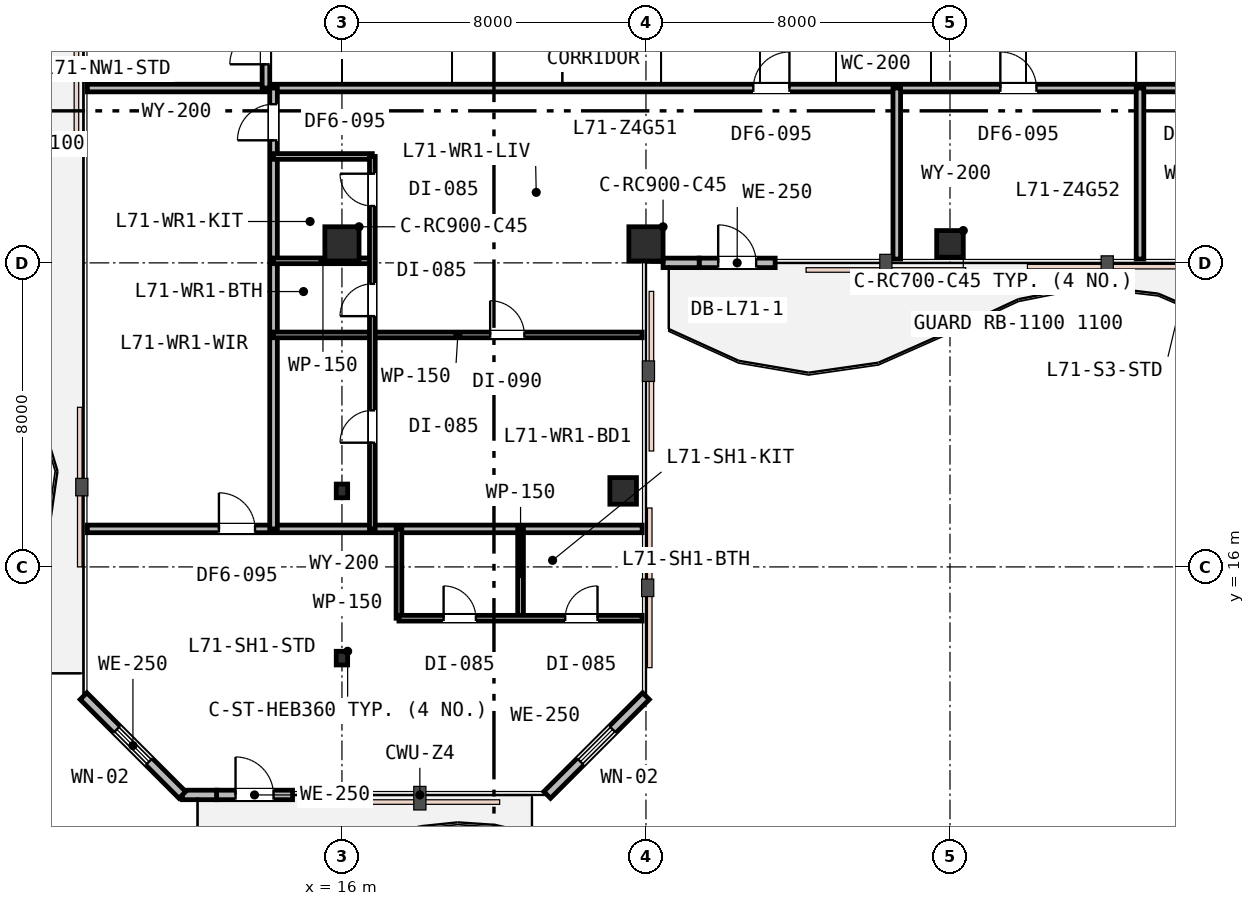
"""IFC4 building model, lengths in metres.
Left out: names, types, materials, properties, quantities, classifications, styles, units other than length and angle.
Written with IfcOpenShell. Run it as: python <this file> out.ifc"""

import sys

from ifc_helpers import new_model, si_unit, direction, frame, frame_2d, origin, origin_2d, place, context, subcontext, project, spatial, rectangle, i_section, extrude, element, fill, save


model = new_model("IFC4")
c1 = context("Model", 3, precision=1e-05, world=origin(), true_north=direction((0.0, 1.0)))
c2 = subcontext(c1, "Body", "Model", "MODEL_VIEW")
j1 = project(units=[si_unit("LENGTHUNIT", "METRE"), si_unit("PLANEANGLEUNIT", "RADIAN")], contexts=[c1])
p1 = place(None, origin())
s1 = spatial("IfcSite", under=j1, at=p1, CompositionType="ELEMENT")
p2 = place(p1, origin())
s2 = spatial("IfcBuilding", under=s1, at=p2, CompositionType="ELEMENT")
p3 = place(p2, frame((0.0, 0.0, 275.4)))
s3 = spatial("IfcBuildingStorey", under=s2, at=p3, CompositionType="ELEMENT", Elevation=275.4)
for number, where, z_axis, x_axis in (
    (1, (16.0, 24.5, 0.0), (0.0, 0.0, 1.0), (1.0, 0.0, 0.0)),
    (2, (24.0, 24.5, 0.0), (0.0, 0.0, 1.0), (1.0, 0.0, 0.0)),
):
    element("IfcColumn", number, at=place(p3, frame(where, z_axis=z_axis, x_axis=x_axis)), inside=s3, PredefinedType="COLUMN", context=c2, shape_type="SweptSolid", body=[
        extrude(rectangle(XDim=0.9, YDim=0.9, at=origin_2d()), origin(), (0.0, 0.0, 1.0), 3.8),
    ])
for number, where, z_axis, x_axis in (
    (3, (32.0, 24.5, 0.0), (0.0, 0.0, 1.0), (1.0, 0.0, 0.0)),
    (4, (23.4, 18.0, 0.0), (0.0, 0.0, 1.0), (1.0, 0.0, 0.0)),
):
    element("IfcColumn", number, at=place(p3, frame(where, z_axis=z_axis, x_axis=x_axis)), inside=s3, PredefinedType="COLUMN", context=c2, shape_type="SweptSolid", body=[
        extrude(rectangle(XDim=0.7, YDim=0.7, at=origin_2d()), origin(), (0.0, 0.0, 1.0), 3.8),
    ])
for number, where, z_axis, x_axis in (
    (5, (16.0, 13.6, 0.0), (0.0, 0.0, 1.0), (1.0, 0.0, 0.0)),
    (6, (16.0, 18.0, 0.0), (0.0, 0.0, 1.0), (1.0, 0.0, 0.0)),
):
    element("IfcColumn", number, at=place(p3, frame(where, z_axis=z_axis, x_axis=x_axis)), inside=s3, PredefinedType="COLUMN", context=c2, shape_type="SweptSolid", body=[
        extrude(i_section(OverallWidth=0.3, OverallDepth=0.36, WebThickness=0.013, FlangeThickness=0.022, FilletRadius=0.027, at=origin_2d()), origin(), (0.0, 0.0, 1.0), 3.8),
    ])
p4 = place(p3, frame((12.7, 10.0, 0.0), z_axis=(0.0, 0.0, 1.0), x_axis=(1.0, 0.0, 0.0)))
e7 = element("IfcWall", 7, at=p4, inside=s3, PredefinedType="STANDARD", context=c2, shape_type="SweptSolid", body=[
    extrude(rectangle(XDim=2.0, YDim=0.25, at=frame_2d((1.0, 0.0))), origin(), (0.0, 0.0, 1.0), 3.53),
])
p5 = place(p4, frame((0.5, 0.0, 0.0)))
e8 = element("IfcOpeningElement", 8, at=p5, cuts=e7, PredefinedType="OPENING", context=c2, shape_type="SweptSolid", body=[
    extrude(rectangle(XDim=1.0, YDim=2.15, at=frame_2d((0.5, 1.075))), frame((0.0, 0.135, 0.0), z_axis=(0.0, -1.0, 0.0), x_axis=(1.0, 0.0, 0.0)), (0.0, 0.0, 1.0), 0.27),
])
p6 = place(p3, frame((11.8, 10.0, 0.0), z_axis=(0.0, 0.0, 1.0), x_axis=(1.0, 0.0, 0.0)))
e9 = element("IfcWall", 9, at=p6, inside=s3, PredefinedType="STANDARD", context=c2, shape_type="SweptSolid", body=[
    extrude(rectangle(XDim=0.9, YDim=0.25, at=frame_2d((0.45, 0.0))), origin(), (0.0, 0.0, 1.0), 3.53),
])
p7 = place(p3, frame((21.4, 10.0, 0.0), z_axis=(0.0, 0.0, 1.0), x_axis=(0.707106781187, 0.707106781187, 0.0)))
e10 = element("IfcWall", 10, at=p7, inside=s3, PredefinedType="STANDARD", context=c2, shape_type="SweptSolid", body=[
    extrude(rectangle(XDim=3.677, YDim=0.25, at=frame_2d((1.839, 0.0))), origin(), (0.0, 0.0, 1.0), 3.53),
])
p8 = place(p7, frame((1.238, 0.0, 0.85)))
e11 = element("IfcOpeningElement", 11, at=p8, cuts=e10, PredefinedType="OPENING", context=c2, shape_type="SweptSolid", body=[
    extrude(rectangle(XDim=1.2, YDim=1.6, at=frame_2d((0.6, 0.8))), frame((0.0, 0.135, 0.0), z_axis=(0.0, -1.0, 0.0), x_axis=(1.0, 0.0, 0.0)), (0.0, 0.0, 1.0), 0.27),
])
p9 = place(p3, frame((25.4, 24.0, 0.0), z_axis=(0.0, 0.0, 1.0), x_axis=(1.0, 0.0, 0.0)))
e12 = element("IfcWall", 12, at=p9, inside=s3, PredefinedType="STANDARD", context=c2, shape_type="SweptSolid", body=[
    extrude(rectangle(XDim=2.0, YDim=0.25, at=frame_2d((1.0, 0.0))), origin(), (0.0, 0.0, 1.0), 3.27),
])
p10 = place(p9, frame((0.5, 0.0, 0.0)))
e13 = element("IfcOpeningElement", 13, at=p10, cuts=e12, PredefinedType="OPENING", context=c2, shape_type="SweptSolid", body=[
    extrude(rectangle(XDim=1.0, YDim=2.15, at=frame_2d((0.5, 1.075))), frame((0.0, 0.135, 0.0), z_axis=(0.0, -1.0, 0.0), x_axis=(1.0, 0.0, 0.0)), (0.0, 0.0, 1.0), 0.27),
])
p11 = place(p3, frame((24.45, 24.0, 0.0), z_axis=(0.0, 0.0, 1.0), x_axis=(1.0, 0.0, 0.0)))
e14 = element("IfcWall", 14, at=p11, inside=s3, PredefinedType="STANDARD", context=c2, shape_type="SweptSolid", body=[
    extrude(rectangle(XDim=0.95, YDim=0.25, at=frame_2d((0.475, 0.0))), origin(), (0.0, 0.0, 1.0), 3.27),
])
p12 = place(p3, frame((9.2, 12.6, 0.0), z_axis=(0.0, 0.0, 1.0), x_axis=(0.707106781187, -0.707106781187, 0.0)))
e15 = element("IfcWall", 15, at=p12, inside=s3, PredefinedType="STANDARD", context=c2, shape_type="SweptSolid", body=[
    extrude(rectangle(XDim=3.677, YDim=0.25, at=frame_2d((1.839, 0.0))), origin(), (0.0, 0.0, 1.0), 3.53),
])
p13 = place(p12, frame((1.238, 0.0, 0.85)))
e16 = element("IfcOpeningElement", 16, at=p13, cuts=e15, PredefinedType="OPENING", context=c2, shape_type="SweptSolid", body=[
    extrude(rectangle(XDim=1.2, YDim=1.6, at=frame_2d((0.6, 0.8))), frame((0.0, 0.135, 0.0), z_axis=(0.0, -1.0, 0.0), x_axis=(1.0, 0.0, 0.0)), (0.0, 0.0, 1.0), 0.27),
])
p14 = place(p3, frame((9.3, 28.6, 0.0), z_axis=(0.0, 0.0, 1.0), x_axis=(1.0, 0.0, 0.0)))
e17 = element("IfcWall", 17, at=p14, inside=s3, PredefinedType="PARTITIONING", context=c2, shape_type="SweptSolid", body=[
    extrude(rectangle(XDim=4.7, YDim=0.2, at=frame_2d((2.35, 0.0))), origin(), (0.0, 0.0, 1.0), 3.53),
])
p15 = place(p3, frame((14.2, 28.6, 0.0), z_axis=(0.0, 0.0, 1.0), x_axis=(1.0, 0.0, 0.0)))
e18 = element("IfcWall", 18, at=p15, inside=s3, PredefinedType="PARTITIONING", context=c2, shape_type="SweptSolid", body=[
    extrude(rectangle(XDim=31.7, YDim=0.2, at=frame_2d((15.85, 0.0))), origin(), (0.0, 0.0, 1.0), 3.16),
])
p16 = place(p15, frame((12.625, 0.0, 0.0)))
e19 = element("IfcOpeningElement", 19, at=p16, cuts=e18, PredefinedType="OPENING", context=c2, shape_type="SweptSolid", body=[
    extrude(rectangle(XDim=0.95, YDim=2.15, at=frame_2d((0.475, 1.075))), frame((0.0, 0.11, 0.0), z_axis=(0.0, -1.0, 0.0), x_axis=(1.0, 0.0, 0.0)), (0.0, 0.0, 1.0), 0.22),
])
p17 = place(p15, frame((19.125, 0.0, 0.0)))
e20 = element("IfcOpeningElement", 20, at=p17, cuts=e18, PredefinedType="OPENING", context=c2, shape_type="SweptSolid", body=[
    extrude(rectangle(XDim=0.95, YDim=2.15, at=frame_2d((0.475, 1.075))), frame((0.0, 0.11, 0.0), z_axis=(0.0, -1.0, 0.0), x_axis=(1.0, 0.0, 0.0)), (0.0, 0.0, 1.0), 0.22),
])
p18 = place(p15, frame((24.016, 0.0, 0.0)))
e21 = element("IfcOpeningElement", 21, at=p18, cuts=e18, PredefinedType="OPENING", context=c2, shape_type="SweptSolid", body=[
    extrude(rectangle(XDim=0.95, YDim=2.15, at=frame_2d((0.475, 1.075))), frame((0.0, 0.11, 0.0), z_axis=(0.0, -1.0, 0.0), x_axis=(1.0, 0.0, 0.0)), (0.0, 0.0, 1.0), 0.22),
])
p19 = place(p3, frame((14.0, 28.6, 0.0), z_axis=(0.0, 0.0, 1.0), x_axis=(0.0, 1.0, 0.0)))
e22 = element("IfcWall", 22, at=p19, inside=s3, PredefinedType="PARTITIONING", context=c2, shape_type="SweptSolid", body=[
    extrude(rectangle(XDim=14.3, YDim=0.2, at=frame_2d((7.15, 0.0))), origin(), (0.0, 0.0, 1.0), 3.53),
])
p20 = place(p19, frame((0.625, 0.0, 0.0)))
e23 = element("IfcOpeningElement", 23, at=p20, cuts=e22, PredefinedType="OPENING", context=c2, shape_type="SweptSolid", body=[
    extrude(rectangle(XDim=0.95, YDim=2.15, at=frame_2d((0.475, 1.075))), frame((0.0, 0.11, 0.0), z_axis=(0.0, -1.0, 0.0), x_axis=(1.0, 0.0, 0.0)), (0.0, 0.0, 1.0), 0.22),
])
for number, where, z_axis, x_axis in (
    (24, (30.6, 24.1, 0.0), (0.0, 0.0, 1.0), (0.0, 1.0, 0.0)),
    (25, (37.0, 24.1, 0.0), (0.0, 0.0, 1.0), (0.0, 1.0, 0.0)),
):
    element("IfcWall", number, at=place(p3, frame(where, z_axis=z_axis, x_axis=x_axis)), inside=s3, PredefinedType="PARTITIONING", context=c2, shape_type="SweptSolid", body=[
        extrude(rectangle(XDim=4.5, YDim=0.2, at=frame_2d((2.25, 0.0))), origin(), (0.0, 0.0, 1.0), 3.27),
    ])
p21 = place(p3, frame((9.3, 17.0, 0.0), z_axis=(0.0, 0.0, 1.0), x_axis=(1.0, 0.0, 0.0)))
e26 = element("IfcWall", 26, at=p21, inside=s3, PredefinedType="PARTITIONING", context=c2, shape_type="SweptSolid", body=[
    extrude(rectangle(XDim=14.6, YDim=0.2, at=frame_2d((7.3, 0.0))), origin(), (0.0, 0.0, 1.0), 3.16),
])
p22 = place(p21, frame((3.463, 0.0, 0.0)))
e27 = element("IfcOpeningElement", 27, at=p22, cuts=e26, PredefinedType="OPENING", context=c2, shape_type="SweptSolid", body=[
    extrude(rectangle(XDim=0.95, YDim=2.15, at=frame_2d((0.475, 1.075))), frame((0.0, 0.11, 0.0), z_axis=(0.0, -1.0, 0.0), x_axis=(1.0, 0.0, 0.0)), (0.0, 0.0, 1.0), 0.22),
])
p23 = place(p3, frame((14.2, 17.0, 0.0), z_axis=(0.0, 0.0, 1.0), x_axis=(0.0, 1.0, 0.0)))
e28 = element("IfcWall", 28, at=p23, inside=s3, PredefinedType="PARTITIONING", context=c2, shape_type="SweptSolid", body=[
    extrude(rectangle(XDim=11.6, YDim=0.2, at=frame_2d((5.8, 0.0))), origin(), (0.0, 0.0, 1.0), 3.53),
])
p24 = place(p23, frame((10.225, 0.0, 0.0)))
e29 = element("IfcOpeningElement", 29, at=p24, cuts=e28, PredefinedType="OPENING", context=c2, shape_type="SweptSolid", body=[
    extrude(rectangle(XDim=0.95, YDim=2.15, at=frame_2d((0.475, 1.075))), frame((0.0, 0.11, 0.0), z_axis=(0.0, -1.0, 0.0), x_axis=(1.0, 0.0, 0.0)), (0.0, 0.0, 1.0), 0.22),
])
p25 = place(p3, frame((14.2, 22.104, 0.0), z_axis=(0.0, 0.0, 1.0), x_axis=(1.0, 0.0, 0.0)))
e30 = element("IfcWall", 30, at=p25, inside=s3, PredefinedType="PARTITIONING", context=c2, shape_type="SweptSolid", body=[
    extrude(rectangle(XDim=9.7, YDim=0.15, at=frame_2d((4.85, 0.0))), origin(), (0.0, 0.0, 1.0), 3.16),
])
p26 = place(p25, frame((5.7, 0.0, 0.0)))
e31 = element("IfcOpeningElement", 31, at=p26, cuts=e30, PredefinedType="OPENING", context=c2, shape_type="SweptSolid", body=[
    extrude(rectangle(XDim=0.9, YDim=2.15, at=frame_2d((0.45, 1.075))), frame((0.0, 0.085, 0.0), z_axis=(0.0, -1.0, 0.0), x_axis=(1.0, 0.0, 0.0)), (0.0, 0.0, 1.0), 0.17),
])
for number, where, z_axis, x_axis in (
    (32, (14.2, 24.054, 0.0), (0.0, 0.0, 1.0), (1.0, 0.0, 0.0)),
    (33, (14.2, 26.8, 0.0), (0.0, 0.0, 1.0), (1.0, 0.0, 0.0)),
):
    element("IfcWall", number, at=place(p3, frame(where, z_axis=z_axis, x_axis=x_axis)), inside=s3, PredefinedType="PARTITIONING", context=c2, shape_type="SweptSolid", body=[
        extrude(rectangle(XDim=2.6, YDim=0.15, at=frame_2d((1.3, 0.0))), origin(), (0.0, 0.0, 1.0), 3.16),
    ])
p27 = place(p3, frame((16.8, 17.0, 0.0), z_axis=(0.0, 0.0, 1.0), x_axis=(0.0, 1.0, 0.0)))
e34 = element("IfcWall", 34, at=p27, inside=s3, PredefinedType="PARTITIONING", context=c2, shape_type="SweptSolid", body=[
    extrude(rectangle(XDim=9.8, YDim=0.15, at=frame_2d((4.9, 0.0))), origin(), (0.0, 0.0, 1.0), 3.16),
])
p28 = place(p27, frame((5.598, 0.0, 0.0)))
e35 = element("IfcOpeningElement", 35, at=p28, cuts=e34, PredefinedType="OPENING", context=c2, shape_type="SweptSolid", body=[
    extrude(rectangle(XDim=0.85, YDim=2.15, at=frame_2d((0.425, 1.075))), frame((0.0, 0.085, 0.0), z_axis=(0.0, -1.0, 0.0), x_axis=(1.0, 0.0, 0.0)), (0.0, 0.0, 1.0), 0.17),
])
p29 = place(p27, frame((8.496, 0.0, 0.0)))
e36 = element("IfcOpeningElement", 36, at=p29, cuts=e34, PredefinedType="OPENING", context=c2, shape_type="SweptSolid", body=[
    extrude(rectangle(XDim=0.85, YDim=2.15, at=frame_2d((0.425, 1.075))), frame((0.0, 0.085, 0.0), z_axis=(0.0, -1.0, 0.0), x_axis=(1.0, 0.0, 0.0)), (0.0, 0.0, 1.0), 0.17),
])
p30 = place(p27, frame((2.268, 0.0, 0.0)))
e37 = element("IfcOpeningElement", 37, at=p30, cuts=e34, PredefinedType="OPENING", context=c2, shape_type="SweptSolid", body=[
    extrude(rectangle(XDim=0.85, YDim=2.15, at=frame_2d((0.425, 1.075))), frame((0.0, 0.085, 0.0), z_axis=(0.0, -1.0, 0.0), x_axis=(1.0, 0.0, 0.0)), (0.0, 0.0, 1.0), 0.17),
])
for number, where, z_axis, x_axis in (
    (38, (17.5, 14.65, 0.0), (0.0, 0.0, 1.0), (0.0, 1.0, 0.0)),
    (39, (20.7, 14.65, 0.0), (0.0, 0.0, 1.0), (0.0, 1.0, 0.0)),
):
    element("IfcWall", number, at=place(p3, frame(where, z_axis=z_axis, x_axis=x_axis)), inside=s3, PredefinedType="PARTITIONING", context=c2, shape_type="SweptSolid", body=[
        extrude(rectangle(XDim=2.35, YDim=0.15, at=frame_2d((1.175, 0.0))), origin(), (0.0, 0.0, 1.0), 3.53),
    ])
p31 = place(p3, frame((17.5, 14.65, 0.0), z_axis=(0.0, 0.0, 1.0), x_axis=(1.0, 0.0, 0.0)))
e40 = element("IfcWall", 40, at=p31, inside=s3, PredefinedType="PARTITIONING", context=c2, shape_type="SweptSolid", body=[
    extrude(rectangle(XDim=6.4, YDim=0.15, at=frame_2d((3.2, 0.0))), origin(), (0.0, 0.0, 1.0), 3.53),
])
p32 = place(p31, frame((1.175, 0.0, 0.0)))
e41 = element("IfcOpeningElement", 41, at=p32, cuts=e40, PredefinedType="OPENING", context=c2, shape_type="SweptSolid", body=[
    extrude(rectangle(XDim=0.85, YDim=2.15, at=frame_2d((0.425, 1.075))), frame((0.0, 0.085, 0.0), z_axis=(0.0, -1.0, 0.0), x_axis=(1.0, 0.0, 0.0)), (0.0, 0.0, 1.0), 0.17),
])
p33 = place(p31, frame((4.375, 0.0, 0.0)))
e42 = element("IfcOpeningElement", 42, at=p33, cuts=e40, PredefinedType="OPENING", context=c2, shape_type="SweptSolid", body=[
    extrude(rectangle(XDim=0.85, YDim=2.15, at=frame_2d((0.425, 1.075))), frame((0.0, 0.085, 0.0), z_axis=(0.0, -1.0, 0.0), x_axis=(1.0, 0.0, 0.0)), (0.0, 0.0, 1.0), 0.17),
])
p34 = place(p5, origin())
e43 = element("IfcDoor", 43, at=p34, inside=s3, OperationType="SINGLE_SWING_LEFT", PredefinedType="DOOR", context=c2, shape_type="SweptSolid", body=[
    extrude(rectangle(XDim=1.0, YDim=2.15, at=frame_2d((0.5, 1.075))), frame((0.0, 0.025, 0.0), z_axis=(0.0, -1.0, 0.0), x_axis=(1.0, 0.0, 0.0)), (0.0, 0.0, 1.0), 0.05),
])
fill(e8, e43)
p35 = place(p8, origin())
e44 = element("IfcWindow", 44, at=p35, inside=s3, PartitioningType="SINGLE_PANEL", PredefinedType="WINDOW", context=c2, shape_type="SweptSolid", body=[
    extrude(rectangle(XDim=1.2, YDim=1.6, at=frame_2d((0.6, 0.8))), frame((0.0, 0.03, 0.0), z_axis=(0.0, -1.0, 0.0), x_axis=(1.0, 0.0, 0.0)), (0.0, 0.0, 1.0), 0.06),
])
fill(e11, e44)
p36 = place(p10, origin())
e45 = element("IfcDoor", 45, at=p36, inside=s3, OperationType="SINGLE_SWING_LEFT", PredefinedType="DOOR", context=c2, shape_type="SweptSolid", body=[
    extrude(rectangle(XDim=1.0, YDim=2.15, at=frame_2d((0.5, 1.075))), frame((0.0, 0.025, 0.0), z_axis=(0.0, -1.0, 0.0), x_axis=(1.0, 0.0, 0.0)), (0.0, 0.0, 1.0), 0.05),
])
fill(e13, e45)
p37 = place(p13, origin())
e46 = element("IfcWindow", 46, at=p37, inside=s3, PartitioningType="SINGLE_PANEL", PredefinedType="WINDOW", context=c2, shape_type="SweptSolid", body=[
    extrude(rectangle(XDim=1.2, YDim=1.6, at=frame_2d((0.6, 0.8))), frame((0.0, 0.03, 0.0), z_axis=(0.0, -1.0, 0.0), x_axis=(1.0, 0.0, 0.0)), (0.0, 0.0, 1.0), 0.06),
])
fill(e16, e46)
p38 = place(p20, origin())
e47 = element("IfcDoor", 47, at=p38, inside=s3, OperationType="SINGLE_SWING_LEFT", PredefinedType="DOOR", context=c2, shape_type="SweptSolid", body=[
    extrude(rectangle(XDim=0.95, YDim=2.15, at=frame_2d((0.475, 1.075))), frame((0.0, 0.025, 0.0), z_axis=(0.0, -1.0, 0.0), x_axis=(1.0, 0.0, 0.0)), (0.0, 0.0, 1.0), 0.05),
])
fill(e23, e47)
p39 = place(p16, origin())
e48 = element("IfcDoor", 48, at=p39, inside=s3, OperationType="SINGLE_SWING_RIGHT", PredefinedType="DOOR", context=c2, shape_type="SweptSolid", body=[
    extrude(rectangle(XDim=0.95, YDim=2.15, at=frame_2d((0.475, 1.075))), frame((0.0, 0.025, 0.0), z_axis=(0.0, -1.0, 0.0), x_axis=(1.0, 0.0, 0.0)), (0.0, 0.0, 1.0), 0.05),
])
fill(e19, e48)
p40 = place(p17, origin())
e49 = element("IfcDoor", 49, at=p40, inside=s3, OperationType="SINGLE_SWING_LEFT", PredefinedType="DOOR", context=c2, shape_type="SweptSolid", body=[
    extrude(rectangle(XDim=0.95, YDim=2.15, at=frame_2d((0.475, 1.075))), frame((0.0, 0.025, 0.0), z_axis=(0.0, -1.0, 0.0), x_axis=(1.0, 0.0, 0.0)), (0.0, 0.0, 1.0), 0.05),
])
fill(e20, e49)
p41 = place(p24, origin())
e50 = element("IfcDoor", 50, at=p41, inside=s3, OperationType="SINGLE_SWING_LEFT", PredefinedType="DOOR", context=c2, shape_type="SweptSolid", body=[
    extrude(rectangle(XDim=0.95, YDim=2.15, at=frame_2d((0.475, 1.075))), frame((0.0, 0.025, 0.0), z_axis=(0.0, -1.0, 0.0), x_axis=(1.0, 0.0, 0.0)), (0.0, 0.0, 1.0), 0.05),
])
fill(e29, e50)
p42 = place(p28, origin())
e51 = element("IfcDoor", 51, at=p42, inside=s3, OperationType="SINGLE_SWING_LEFT", PredefinedType="DOOR", context=c2, shape_type="SweptSolid", body=[
    extrude(rectangle(XDim=0.85, YDim=2.15, at=frame_2d((0.425, 1.075))), frame((0.0, 0.025, 0.0), z_axis=(0.0, -1.0, 0.0), x_axis=(1.0, 0.0, 0.0)), (0.0, 0.0, 1.0), 0.05),
])
fill(e35, e51)
p43 = place(p29, origin())
e52 = element("IfcDoor", 52, at=p43, inside=s3, OperationType="SINGLE_SWING_RIGHT", PredefinedType="DOOR", context=c2, shape_type="SweptSolid", body=[
    extrude(rectangle(XDim=0.85, YDim=2.15, at=frame_2d((0.425, 1.075))), frame((0.0, 0.025, 0.0), z_axis=(0.0, -1.0, 0.0), x_axis=(1.0, 0.0, 0.0)), (0.0, 0.0, 1.0), 0.05),
])
fill(e36, e52)
p44 = place(p30, origin())
e53 = element("IfcDoor", 53, at=p44, inside=s3, OperationType="SINGLE_SWING_LEFT", PredefinedType="DOOR", context=c2, shape_type="SweptSolid", body=[
    extrude(rectangle(XDim=0.85, YDim=2.15, at=frame_2d((0.425, 1.075))), frame((0.0, 0.025, 0.0), z_axis=(0.0, -1.0, 0.0), x_axis=(1.0, 0.0, 0.0)), (0.0, 0.0, 1.0), 0.05),
])
fill(e37, e53)
p45 = place(p26, origin())
e54 = element("IfcDoor", 54, at=p45, inside=s3, OperationType="SINGLE_SWING_LEFT", PredefinedType="DOOR", context=c2, shape_type="SweptSolid", body=[
    extrude(rectangle(XDim=0.9, YDim=2.15, at=frame_2d((0.45, 1.075))), frame((0.0, 0.025, 0.0), z_axis=(0.0, -1.0, 0.0), x_axis=(1.0, 0.0, 0.0)), (0.0, 0.0, 1.0), 0.05),
])
fill(e31, e54)
p46 = place(p22, origin())
e55 = element("IfcDoor", 55, at=p46, inside=s3, OperationType="SINGLE_SWING_LEFT", PredefinedType="DOOR", context=c2, shape_type="SweptSolid", body=[
    extrude(rectangle(XDim=0.95, YDim=2.15, at=frame_2d((0.475, 1.075))), frame((0.0, 0.025, 0.0), z_axis=(0.0, -1.0, 0.0), x_axis=(1.0, 0.0, 0.0)), (0.0, 0.0, 1.0), 0.05),
])
fill(e27, e55)
p47 = place(p32, origin())
e56 = element("IfcDoor", 56, at=p47, inside=s3, OperationType="SINGLE_SWING_LEFT", PredefinedType="DOOR", context=c2, shape_type="SweptSolid", body=[
    extrude(rectangle(XDim=0.85, YDim=2.15, at=frame_2d((0.425, 1.075))), frame((0.0, 0.025, 0.0), z_axis=(0.0, -1.0, 0.0), x_axis=(1.0, 0.0, 0.0)), (0.0, 0.0, 1.0), 0.05),
])
fill(e41, e56)
p48 = place(p33, origin())
e57 = element("IfcDoor", 57, at=p48, inside=s3, OperationType="SINGLE_SWING_RIGHT", PredefinedType="DOOR", context=c2, shape_type="SweptSolid", body=[
    extrude(rectangle(XDim=0.85, YDim=2.15, at=frame_2d((0.425, 1.075))), frame((0.0, 0.025, 0.0), z_axis=(0.0, -1.0, 0.0), x_axis=(1.0, 0.0, 0.0)), (0.0, 0.0, 1.0), 0.05),
])
fill(e42, e57)
save(model, sys.argv[1])
